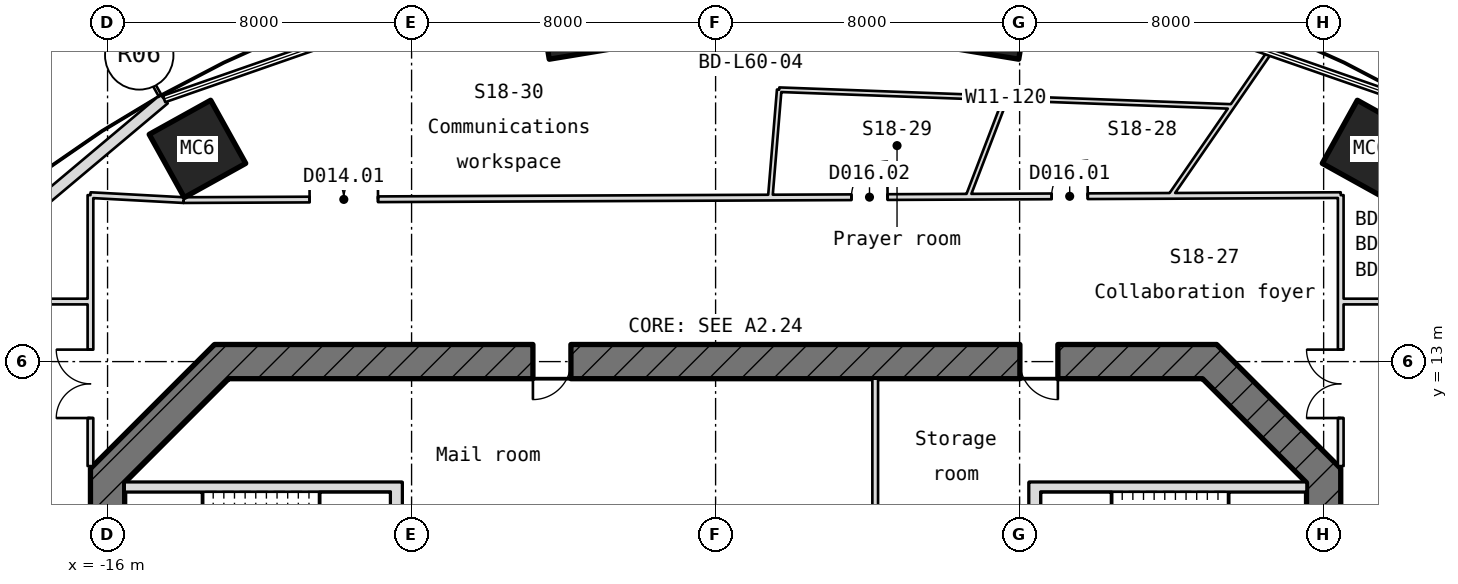
"""IFC4 building model, lengths in metres.
Left out: names, types, materials, properties, quantities, classifications, styles, units other than length and angle.
Written with IfcOpenShell. Run it as: python <this file> out.ifc"""

import sys

from ifc_helpers import new_model, si_unit, direction, frame, frame_2d, origin, origin_2d, place, context, subcontext, project, spatial, rectangle, hollow_rectangle, extrude, element, fill, save


model = new_model("IFC4")
c1 = context("Model", 3, precision=1e-05, world=origin(), true_north=direction((0.0, 1.0)))
c2 = subcontext(c1, "Body", "Model", "MODEL_VIEW")
j1 = project(units=[si_unit("LENGTHUNIT", "METRE"), si_unit("PLANEANGLEUNIT", "RADIAN")], contexts=[c1])
p1 = place(None, origin())
s1 = spatial("IfcSite", under=j1, at=p1, CompositionType="ELEMENT")
p2 = place(p1, origin())
s2 = spatial("IfcBuilding", under=s1, at=p2, CompositionType="ELEMENT")
p3 = place(p2, frame((0.0, 0.0, 260.65)))
s3 = spatial("IfcBuildingStorey", under=s2, at=p3, CompositionType="ELEMENT", Elevation=260.65)
for number, where, z_axis, x_axis in (
    (1, (17.234, 18.597, -0.18), (0.0, 0.0, 1.0), (0.874, -0.485, 0.0)),
    (2, (7.22, 22.044, -0.18), (0.0, 0.0, 1.0), (0.987, -0.163, 0.0)),
    (3, (-3.62, 22.044, -0.18), (0.0, 0.0, 1.0), (0.987, 0.163, 0.0)),
    (4, (-13.634, 18.597, -0.18), (0.0, 0.0, 1.0), (0.874, 0.485, 0.0)),
):
    element("IfcColumn", number, at=place(p3, frame(where, z_axis=z_axis, x_axis=x_axis)), inside=s3, PredefinedType="COLUMN", context=c2, shape_type="SweptSolid", body=[
        extrude(hollow_rectangle(XDim=1.85, YDim=1.9, WallThickness=0.065, at=origin_2d()), origin(), (0.0, 0.0, 1.0), 4.15),
    ])
p4 = place(p3, frame((-14.512, 19.911, 0.0), z_axis=(0.0, 0.0, 1.0), x_axis=(-0.76563894676, -0.643270552104, 0.0)))
e5 = element("IfcWall", 5, at=p4, inside=s3, PredefinedType="SOLIDWALL", context=c2, shape_type="SweptSolid", body=[
    extrude(rectangle(XDim=10.58, YDim=0.3, at=frame_2d((5.29, 0.0))), origin(), (0.0, 0.0, 1.0), 3.97),
])
p5 = place(p4, frame((6.88, 0.0, 0.0)))
e6 = element("IfcOpeningElement", 6, at=p5, cuts=e5, PredefinedType="OPENING", context=c2, shape_type="SweptSolid", body=[
    extrude(rectangle(XDim=1.8, YDim=2.4, at=frame_2d((0.9, 1.2))), frame((0.0, 0.16, 0.0), z_axis=(0.0, -1.0, 0.0), x_axis=(1.0, 0.0, 0.0)), (0.0, 0.0, 1.0), 0.32),
])
p6 = place(p4, frame((4.28, 0.0, 0.9)))
e7 = element("IfcOpeningElement", 7, at=p6, cuts=e5, PredefinedType="OPENING", context=c2, shape_type="SweptSolid", body=[
    extrude(rectangle(XDim=2.0, YDim=1.5, at=frame_2d((1.0, 0.75))), frame((0.0, 0.16, 0.0), z_axis=(0.0, -1.0, 0.0), x_axis=(1.0, 0.0, 0.0)), (0.0, 0.0, 1.0), 0.32),
])
p7 = place(p3, frame((16.0, -10.186, -0.18), z_axis=(0.0, 0.0, 1.0), x_axis=(0.0, 1.0, 0.0)))
e8 = element("IfcWall", 8, at=p7, inside=s3, PredefinedType="SHEAR", context=c2, shape_type="SweptSolid", body=[
    extrude(rectangle(XDim=20.373, YDim=0.9, at=frame_2d((10.186, 0.0))), origin(), (0.0, 0.0, 1.0), 4.15),
])
p8 = place(p7, frame((8.986, 0.0, 0.18)))
e9 = element("IfcOpeningElement", 9, at=p8, cuts=e8, PredefinedType="OPENING", context=c2, shape_type="SweptSolid", body=[
    extrude(rectangle(XDim=2.4, YDim=2.1, at=frame_2d((1.2, 1.05))), frame((0.0, 0.46, 0.0), z_axis=(0.0, -1.0, 0.0), x_axis=(1.0, 0.0, 0.0)), (0.0, 0.0, 1.0), 0.92),
])
p9 = place(p7, frame((13.586, 0.0, 0.18)))
e10 = element("IfcOpeningElement", 10, at=p9, cuts=e8, PredefinedType="OPENING", context=c2, shape_type="SweptSolid", body=[
    extrude(rectangle(XDim=1.2, YDim=2.1, at=frame_2d((0.6, 1.05))), frame((0.0, 0.46, 0.0), z_axis=(0.0, -1.0, 0.0), x_axis=(1.0, 0.0, 0.0)), (0.0, 0.0, 1.0), 0.92),
])
p10 = place(p3, frame((16.132, 9.868, -0.18), z_axis=(0.0, 0.0, 1.0), x_axis=(-0.707106781187, 0.707106781187, 0.0)))
e11 = element("IfcWall", 11, at=p10, inside=s3, PredefinedType="SHEAR", context=c2, shape_type="SweptSolid", body=[
    extrude(rectangle(XDim=4.615, YDim=0.9, at=frame_2d((2.308, 0.0))), origin(), (0.0, 0.0, 1.0), 4.15),
])
p11 = place(p3, frame((13.186, 13.0, -0.18), z_axis=(0.0, 0.0, 1.0), x_axis=(-1.0, 0.0, 0.0)))
e12 = element("IfcWall", 12, at=p11, inside=s3, PredefinedType="SHEAR", context=c2, shape_type="SweptSolid", body=[
    extrude(rectangle(XDim=26.373, YDim=0.9, at=frame_2d((13.186, 0.0))), origin(), (0.0, 0.0, 1.0), 4.15),
])
p12 = place(p11, frame((16.993, 0.0, 0.18)))
e13 = element("IfcOpeningElement", 13, at=p12, cuts=e12, PredefinedType="OPENING", context=c2, shape_type="SweptSolid", body=[
    extrude(rectangle(XDim=1.0, YDim=2.1, at=frame_2d((0.5, 1.05))), frame((0.0, 0.46, 0.0), z_axis=(0.0, -1.0, 0.0), x_axis=(1.0, 0.0, 0.0)), (0.0, 0.0, 1.0), 0.92),
])
p13 = place(p11, frame((4.179, 0.0, 0.18)))
e14 = element("IfcOpeningElement", 14, at=p13, cuts=e12, PredefinedType="OPENING", context=c2, shape_type="SweptSolid", body=[
    extrude(rectangle(XDim=1.0, YDim=2.1, at=frame_2d((0.5, 1.05))), frame((0.0, 0.46, 0.0), z_axis=(0.0, -1.0, 0.0), x_axis=(1.0, 0.0, 0.0)), (0.0, 0.0, 1.0), 0.92),
])
p14 = place(p3, frame((-12.868, 13.132, -0.18), z_axis=(0.0, 0.0, 1.0), x_axis=(-0.707106781187, -0.707106781187, 0.0)))
e15 = element("IfcWall", 15, at=p14, inside=s3, PredefinedType="SHEAR", context=c2, shape_type="SweptSolid", body=[
    extrude(rectangle(XDim=4.615, YDim=0.9, at=frame_2d((2.308, 0.0))), origin(), (0.0, 0.0, 1.0), 4.15),
])
p15 = place(p3, frame((-16.0, 10.186, -0.18), z_axis=(0.0, 0.0, 1.0), x_axis=(0.0, -1.0, 0.0)))
e16 = element("IfcWall", 16, at=p15, inside=s3, PredefinedType="SHEAR", context=c2, shape_type="SweptSolid", body=[
    extrude(rectangle(XDim=20.373, YDim=0.9, at=frame_2d((10.186, 0.0))), origin(), (0.0, 0.0, 1.0), 4.15),
])
p16 = place(p15, frame((8.986, 0.0, 0.18)))
e17 = element("IfcOpeningElement", 17, at=p16, cuts=e16, PredefinedType="OPENING", context=c2, shape_type="SweptSolid", body=[
    extrude(rectangle(XDim=2.4, YDim=2.1, at=frame_2d((1.2, 1.05))), frame((0.0, 0.46, 0.0), z_axis=(0.0, -1.0, 0.0), x_axis=(1.0, 0.0, 0.0)), (0.0, 0.0, 1.0), 0.92),
])
p17 = place(p15, frame((5.586, 0.0, 0.18)))
e18 = element("IfcOpeningElement", 18, at=p17, cuts=e16, PredefinedType="OPENING", context=c2, shape_type="SweptSolid", body=[
    extrude(rectangle(XDim=1.2, YDim=2.1, at=frame_2d((0.6, 1.05))), frame((0.0, 0.46, 0.0), z_axis=(0.0, -1.0, 0.0), x_axis=(1.0, 0.0, 0.0)), (0.0, 0.0, 1.0), 0.92),
])
for number, where, z_axis, x_axis in (
    (19, (-15.55, 9.7, -0.18), (0.0, 0.0, 1.0), (1.0, 0.0, 0.0)),
    (20, (8.55, 9.7, -0.18), (0.0, 0.0, 1.0), (1.0, 0.0, 0.0)),
):
    element("IfcWall", number, at=place(p3, frame(where, z_axis=z_axis, x_axis=x_axis)), inside=s3, PredefinedType="SHEAR", context=c2, shape_type="SweptSolid", body=[
        extrude(rectangle(XDim=7.0, YDim=0.25, at=frame_2d((3.5, 0.0))), origin(), (0.0, 0.0, 1.0), 4.15),
    ])
p18 = place(p3, frame((-8.4, 8.35, -0.18), z_axis=(0.0, 0.0, 1.0), x_axis=(0.0, 1.0, 0.0)))
e21 = element("IfcWall", 21, at=p18, inside=s3, PredefinedType="SHEAR", context=c2, shape_type="SweptSolid", body=[
    extrude(rectangle(XDim=1.475, YDim=0.3, at=frame_2d((0.737, 0.0))), origin(), (0.0, 0.0, 1.0), 4.15),
])
p19 = place(p3, frame((4.2, 8.46, 0.0), z_axis=(0.0, 0.0, 1.0), x_axis=(0.0, 1.0, 0.0)))
e22 = element("IfcWall", 22, at=p19, inside=s3, PredefinedType="PARTITIONING", context=c2, shape_type="SweptSolid", body=[
    extrude(rectangle(XDim=4.09, YDim=0.15, at=frame_2d((2.045, 0.0))), origin(), (0.0, 0.0, 1.0), 3.97),
])
p20 = place(p3, frame((8.4, 8.35, -0.18), z_axis=(0.0, 0.0, 1.0), x_axis=(0.0, 1.0, 0.0)))
e23 = element("IfcWall", 23, at=p20, inside=s3, PredefinedType="SHEAR", context=c2, shape_type="SweptSolid", body=[
    extrude(rectangle(XDim=1.475, YDim=0.3, at=frame_2d((0.737, 0.0))), origin(), (0.0, 0.0, 1.0), 4.15),
])
p21 = place(p3, frame((-18.85, 14.58, 0.0), z_axis=(0.0, 0.0, 1.0), x_axis=(1.0, 0.0, 0.0)))
e24 = element("IfcWall", 24, at=p21, inside=s3, PredefinedType="PARTITIONING", context=c2, shape_type="SweptSolid", body=[
    extrude(rectangle(XDim=2.4, YDim=0.15, at=frame_2d((1.2, 0.0))), origin(), (0.0, 0.0, 1.0), 3.97),
])
p22 = place(p3, frame((-16.45, 10.25, 0.0), z_axis=(0.0, 0.0, 1.0), x_axis=(0.0, 1.0, 0.0)))
e25 = element("IfcWall", 25, at=p22, inside=s3, PredefinedType="PARTITIONING", context=c2, shape_type="SweptSolid", body=[
    extrude(rectangle(XDim=7.13, YDim=0.15, at=frame_2d((3.565, 0.0))), origin(), (0.0, 0.0, 1.0), 3.97),
])
p23 = place(p22, frame((1.265, 0.0, 0.0)))
e26 = element("IfcOpeningElement", 26, at=p23, cuts=e25, PredefinedType="OPENING", context=c2, shape_type="SweptSolid", body=[
    extrude(rectangle(XDim=1.8, YDim=2.1, at=frame_2d((0.9, 1.05))), frame((0.0, 0.085, 0.0), z_axis=(0.0, -1.0, 0.0), x_axis=(1.0, 0.0, 0.0)), (0.0, 0.0, 1.0), 0.17),
])
p24 = place(p3, frame((-16.45, 17.38, 0.0), z_axis=(0.0, 0.0, 1.0), x_axis=(0.998580451671, -0.05326426138, 0.0)))
e27 = element("IfcWall", 27, at=p24, inside=s3, PredefinedType="PARTITIONING", context=c2, shape_type="SweptSolid", body=[
    extrude(rectangle(XDim=2.452, YDim=0.15, at=frame_2d((1.226, 0.0))), origin(), (0.0, 0.0, 1.0), 3.97),
])
p25 = place(p3, frame((-14.001, 17.25, 0.0), z_axis=(0.0, 0.0, 1.0), x_axis=(0.999990800936, 0.004289294132, 0.0)))
e28 = element("IfcWall", 28, at=p25, inside=s3, PredefinedType="PARTITIONING", context=c2, shape_type="SweptSolid", body=[
    extrude(rectangle(XDim=30.451, YDim=0.15, at=frame_2d((15.226, 0.0))), origin(), (0.0, 0.0, 1.0), 3.97),
])
p26 = place(p25, frame((22.844, 0.0, 0.0)))
e29 = element("IfcOpeningElement", 29, at=p26, cuts=e28, PredefinedType="OPENING", context=c2, shape_type="SweptSolid", body=[
    extrude(rectangle(XDim=0.95, YDim=2.1, at=frame_2d((0.475, 1.05))), frame((0.0, 0.085, 0.0), z_axis=(0.0, -1.0, 0.0), x_axis=(1.0, 0.0, 0.0)), (0.0, 0.0, 1.0), 0.17),
])
p27 = place(p25, frame((17.576, 0.0, 0.0)))
e30 = element("IfcOpeningElement", 30, at=p27, cuts=e28, PredefinedType="OPENING", context=c2, shape_type="SweptSolid", body=[
    extrude(rectangle(XDim=0.95, YDim=2.1, at=frame_2d((0.475, 1.05))), frame((0.0, 0.085, 0.0), z_axis=(0.0, -1.0, 0.0), x_axis=(1.0, 0.0, 0.0)), (0.0, 0.0, 1.0), 0.17),
])
p28 = place(p25, frame((3.318, 0.0, 0.0)))
e31 = element("IfcOpeningElement", 31, at=p28, cuts=e28, PredefinedType="OPENING", context=c2, shape_type="SweptSolid", body=[
    extrude(rectangle(XDim=1.8, YDim=2.1, at=frame_2d((0.9, 1.05))), frame((0.0, 0.085, 0.0), z_axis=(0.0, -1.0, 0.0), x_axis=(1.0, 0.0, 0.0)), (0.0, 0.0, 1.0), 0.17),
])
p29 = place(p3, frame((1.674, 20.154, 0.0), z_axis=(0.0, 0.0, 1.0), x_axis=(-0.082798678208, -0.996566294276, 0.0)))
e32 = element("IfcWall", 32, at=p29, inside=s3, PredefinedType="PARTITIONING", context=c2, shape_type="SweptSolid", body=[
    extrude(rectangle(XDim=2.783, YDim=0.12, at=frame_2d((1.392, 0.0))), origin(), (0.0, 0.0, 1.0), 3.553),
])
p30 = place(p3, frame((7.632, 19.933, 0.0), z_axis=(0.0, 0.0, 1.0), x_axis=(-0.357506405086, -0.933910686481, 0.0)))
e33 = element("IfcWall", 33, at=p30, inside=s3, PredefinedType="PARTITIONING", context=c2, shape_type="SweptSolid", body=[
    extrude(rectangle(XDim=2.734, YDim=0.12, at=frame_2d((1.367, 0.0))), origin(), (0.0, 0.0, 1.0), 3.97),
])
p31 = place(p3, frame((11.981, 17.38, 0.0), z_axis=(0.0, 0.0, 1.0), x_axis=(0.567580608416, 0.82331783228, 0.0)))
e34 = element("IfcWall", 34, at=p31, inside=s3, PredefinedType="PARTITIONING", context=c2, shape_type="SweptSolid", body=[
    extrude(rectangle(XDim=4.569, YDim=0.12, at=frame_2d((2.285, 0.0))), origin(), (0.0, 0.0, 1.0), 3.97),
])
p32 = place(p3, frame((13.589, 19.712, 0.0), z_axis=(0.0, 0.0, 1.0), x_axis=(-0.999313711309, 0.037041954465, 0.0)))
e35 = element("IfcWall", 35, at=p32, inside=s3, PredefinedType="PARTITIONING", context=c2, shape_type="SweptSolid", body=[
    extrude(rectangle(XDim=11.923, YDim=0.12, at=frame_2d((5.961, 0.0))), origin(), (0.0, 0.0, 1.0), 3.97),
])
p33 = place(p3, frame((16.45, 10.25, 0.0), z_axis=(0.0, 0.0, 1.0), x_axis=(0.0, 1.0, 0.0)))
e36 = element("IfcWall", 36, at=p33, inside=s3, PredefinedType="PARTITIONING", context=c2, shape_type="SweptSolid", body=[
    extrude(rectangle(XDim=7.13, YDim=0.15, at=frame_2d((3.565, 0.0))), origin(), (0.0, 0.0, 1.0), 3.97),
])
p34 = place(p33, frame((1.265, 0.0, 0.0)))
e37 = element("IfcOpeningElement", 37, at=p34, cuts=e36, PredefinedType="OPENING", context=c2, shape_type="SweptSolid", body=[
    extrude(rectangle(XDim=1.8, YDim=2.1, at=frame_2d((0.9, 1.05))), frame((0.0, 0.085, 0.0), z_axis=(0.0, -1.0, 0.0), x_axis=(1.0, 0.0, 0.0)), (0.0, 0.0, 1.0), 0.17),
])
p35 = place(p3, frame((16.45, 14.58, 0.0), z_axis=(0.0, 0.0, 1.0), x_axis=(1.0, 0.0, 0.0)))
e38 = element("IfcWall", 38, at=p35, inside=s3, PredefinedType="PARTITIONING", context=c2, shape_type="SweptSolid", body=[
    extrude(rectangle(XDim=2.4, YDim=0.15, at=frame_2d((1.2, 0.0))), origin(), (0.0, 0.0, 1.0), 3.97),
])
p36 = place(p12, origin())
e39 = element("IfcDoor", 39, at=p36, inside=s3, OperationType="SINGLE_SWING_RIGHT", PredefinedType="DOOR", context=c2, shape_type="SweptSolid", body=[
    extrude(rectangle(XDim=1.0, YDim=2.1, at=frame_2d((0.5, 1.05))), frame((0.0, 0.025, 0.0), z_axis=(0.0, -1.0, 0.0), x_axis=(1.0, 0.0, 0.0)), (0.0, 0.0, 1.0), 0.05),
])
fill(e13, e39)
p37 = place(p13, origin())
e40 = element("IfcDoor", 40, at=p37, inside=s3, OperationType="SINGLE_SWING_RIGHT", PredefinedType="DOOR", context=c2, shape_type="SweptSolid", body=[
    extrude(rectangle(XDim=1.0, YDim=2.1, at=frame_2d((0.5, 1.05))), frame((0.0, 0.025, 0.0), z_axis=(0.0, -1.0, 0.0), x_axis=(1.0, 0.0, 0.0)), (0.0, 0.0, 1.0), 0.05),
])
fill(e14, e40)
p38 = place(p26, origin())
e41 = element("IfcDoor", 41, at=p38, inside=s3, OperationType="SINGLE_SWING_RIGHT", PredefinedType="DOOR", context=c2, shape_type="SweptSolid", body=[
    extrude(rectangle(XDim=0.95, YDim=2.1, at=frame_2d((0.475, 1.05))), frame((0.0, 0.025, 0.0), z_axis=(0.0, -1.0, 0.0), x_axis=(1.0, 0.0, 0.0)), (0.0, 0.0, 1.0), 0.05),
])
fill(e29, e41)
p39 = place(p27, origin())
e42 = element("IfcDoor", 42, at=p39, inside=s3, OperationType="SINGLE_SWING_RIGHT", PredefinedType="DOOR", context=c2, shape_type="SweptSolid", body=[
    extrude(rectangle(XDim=0.95, YDim=2.1, at=frame_2d((0.475, 1.05))), frame((0.0, 0.025, 0.0), z_axis=(0.0, -1.0, 0.0), x_axis=(1.0, 0.0, 0.0)), (0.0, 0.0, 1.0), 0.05),
])
fill(e30, e42)
p40 = place(p28, origin())
e43 = element("IfcDoor", 43, at=p40, inside=s3, OperationType="DOUBLE_DOOR_SINGLE_SWING", PredefinedType="DOOR", context=c2, shape_type="SweptSolid", body=[
    extrude(rectangle(XDim=1.8, YDim=2.1, at=frame_2d((0.9, 1.05))), frame((0.0, 0.025, 0.0), z_axis=(0.0, -1.0, 0.0), x_axis=(1.0, 0.0, 0.0)), (0.0, 0.0, 1.0), 0.05),
])
fill(e31, e43)
p41 = place(p23, origin())
e44 = element("IfcDoor", 44, at=p41, inside=s3, OperationType="DOUBLE_DOOR_SINGLE_SWING", PredefinedType="DOOR", context=c2, shape_type="SweptSolid", body=[
    extrude(rectangle(XDim=1.8, YDim=2.1, at=frame_2d((0.9, 1.05))), frame((0.0, 0.025, 0.0), z_axis=(0.0, -1.0, 0.0), x_axis=(1.0, 0.0, 0.0)), (0.0, 0.0, 1.0), 0.05),
])
fill(e26, e44)
p42 = place(p34, origin())
e45 = element("IfcDoor", 45, at=p42, inside=s3, OperationType="DOUBLE_DOOR_SINGLE_SWING", PredefinedType="DOOR", context=c2, shape_type="SweptSolid", body=[
    extrude(rectangle(XDim=1.8, YDim=2.1, at=frame_2d((0.9, 1.05))), frame((0.0, 0.025, 0.0), z_axis=(0.0, -1.0, 0.0), x_axis=(1.0, 0.0, 0.0)), (0.0, 0.0, 1.0), 0.05),
])
fill(e37, e45)
save(model, sys.argv[1])
